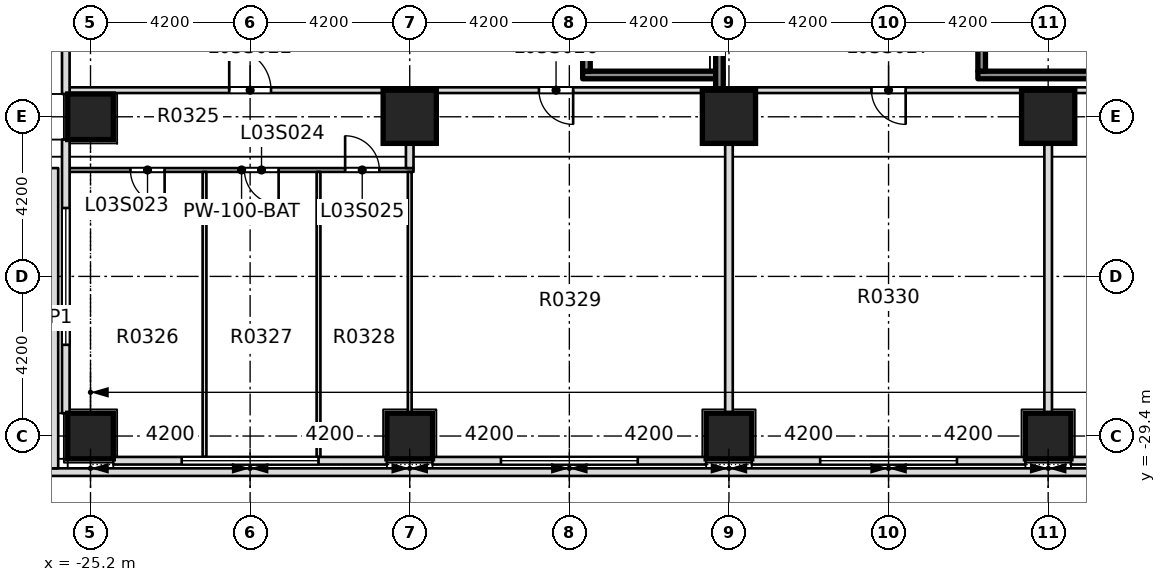
"""IFC4 building model, lengths in metres.
Left out: names, types, materials, properties, quantities, classifications, styles, units other than length and angle.
Written with IfcOpenShell. Run it as: python <this file> out.ifc"""

import sys

from ifc_helpers import new_model, si_unit, direction, frame, frame_2d, origin, origin_2d, place, context, subcontext, project, spatial, rectangle, extrude, element, fill, save


model = new_model("IFC4")
c1 = context("Model", 3, precision=1e-05, world=origin(), true_north=direction((0.0, 1.0)))
c2 = subcontext(c1, "Body", "Model", "MODEL_VIEW")
j1 = project(units=[si_unit("LENGTHUNIT", "METRE"), si_unit("PLANEANGLEUNIT", "RADIAN")], contexts=[c1])
p1 = place(None, origin())
s1 = spatial("IfcSite", under=j1, at=p1, CompositionType="ELEMENT")
p2 = place(p1, origin())
s2 = spatial("IfcBuilding", under=s1, at=p2, CompositionType="ELEMENT")
p3 = place(p2, frame((0.0, 0.0, 20.0)))
s3 = spatial("IfcBuildingStorey", under=s2, at=p3, CompositionType="ELEMENT", Elevation=20.0)
for number, where, z_axis, x_axis in (
    (1, (-16.8, -21.0, -0.4), (0.0, 0.0, 1.0), (1.0, 0.0, 0.0)),
    (2, (-8.4, -21.0, -0.4), (0.0, 0.0, 1.0), (1.0, 0.0, 0.0)),
    (3, (0.0, -21.0, -0.4), (0.0, 0.0, 1.0), (1.0, 0.0, 0.0)),
):
    element("IfcColumn", number, at=place(p3, frame(where, z_axis=z_axis, x_axis=x_axis)), inside=s3, PredefinedType="COLUMN", context=c2, shape_type="SweptSolid", body=[
        extrude(rectangle(XDim=1.4, YDim=1.4, at=origin_2d()), origin(), (0.0, 0.0, 1.0), 5.0),
    ])
for number, where, z_axis, x_axis in (
    (4, (-25.2, -29.4, 0.0), (0.0, 0.0, 1.0), (1.0, 0.0, 0.0)),
    (5, (-16.8, -29.4, 0.0), (0.0, 0.0, 1.0), (1.0, 0.0, 0.0)),
    (6, (-8.4, -29.4, 0.0), (0.0, 0.0, 1.0), (1.0, 0.0, 0.0)),
    (7, (0.0, -29.4, 0.0), (0.0, 0.0, 1.0), (1.0, 0.0, 0.0)),
):
    element("IfcColumn", number, at=place(p3, frame(where, z_axis=z_axis, x_axis=x_axis)), inside=s3, PredefinedType="COLUMN", context=c2, shape_type="SweptSolid", body=[
        extrude(rectangle(XDim=1.2, YDim=1.2, at=origin_2d()), origin(), (0.0, 0.0, 1.0), 4.6),
    ])
p4 = place(p3, frame((-25.2, -21.0, 0.0), z_axis=(0.0, 0.0, 1.0), x_axis=(1.0, 0.0, 0.0)))
e8 = element("IfcColumn", 8, at=p4, inside=s3, PredefinedType="COLUMN", context=c2, shape_type="SweptSolid", body=[
    extrude(rectangle(XDim=1.2, YDim=1.2, at=origin_2d()), origin(), (0.0, 0.0, 1.0), 5.0),
])
p5 = place(p3, frame((-26.25, -30.35, 5.0), z_axis=(0.0, 0.0, 1.0), x_axis=(1.0, 0.0, 0.0)))
e9 = element("IfcWall", 9, at=p5, inside=s3, PredefinedType="PARAPET", context=c2, shape_type="SweptSolid", body=[
    extrude(rectangle(XDim=77.7, YDim=0.2, at=frame_2d((38.85, 0.0))), origin(), (0.0, 0.0, 1.0), 1.2),
])
p6 = place(p3, frame((-26.15, -30.25, 5.0), z_axis=(0.0, 0.0, 1.0), x_axis=(0.0, 1.0, 0.0)))
e10 = element("IfcWall", 10, at=p6, inside=s3, PredefinedType="PARAPET", context=c2, shape_type="SweptSolid", body=[
    extrude(rectangle(XDim=7.9, YDim=0.2, at=frame_2d((3.95, 0.0))), origin(), (0.0, 0.0, 1.0), 1.2),
])
p7 = place(p3, frame((-25.75, -22.4, 0.0), z_axis=(0.0, 0.0, 1.0), x_axis=(1.0, 0.0, 0.0)))
e11 = element("IfcWall", 11, at=p7, inside=s3, PredefinedType="PARTITIONING", context=c2, shape_type="SweptSolid", body=[
    extrude(rectangle(XDim=9.05, YDim=0.1, at=frame_2d((4.525, 0.0))), origin(), (0.0, 0.0, 1.0), 4.6),
])
p8 = place(p7, frame((1.6, 0.0, 0.0)))
e12 = element("IfcOpeningElement", 12, at=p8, cuts=e11, PredefinedType="OPENING", context=c2, shape_type="SweptSolid", body=[
    extrude(rectangle(XDim=0.9, YDim=2.1, at=frame_2d((0.45, 1.05))), frame((0.0, 0.06, 0.0), z_axis=(0.0, -1.0, 0.0), x_axis=(1.0, 0.0, 0.0)), (0.0, 0.0, 1.0), 0.12),
])
p9 = place(p7, frame((4.6, 0.0, 0.0)))
e13 = element("IfcOpeningElement", 13, at=p9, cuts=e11, PredefinedType="OPENING", context=c2, shape_type="SweptSolid", body=[
    extrude(rectangle(XDim=0.9, YDim=2.1, at=frame_2d((0.45, 1.05))), frame((0.0, 0.06, 0.0), z_axis=(0.0, -1.0, 0.0), x_axis=(1.0, 0.0, 0.0)), (0.0, 0.0, 1.0), 0.12),
])
p10 = place(p7, frame((7.25, 0.0, 0.0)))
e14 = element("IfcOpeningElement", 14, at=p10, cuts=e11, PredefinedType="OPENING", context=c2, shape_type="SweptSolid", body=[
    extrude(rectangle(XDim=0.9, YDim=2.1, at=frame_2d((0.45, 1.05))), frame((0.0, 0.06, 0.0), z_axis=(0.0, -1.0, 0.0), x_axis=(1.0, 0.0, 0.0)), (0.0, 0.0, 1.0), 0.12),
])
p11 = place(p3, frame((-25.75, -20.3, 0.0), z_axis=(0.0, 0.0, 1.0), x_axis=(1.0, 0.0, 0.0)))
e15 = element("IfcWall", 15, at=p11, inside=s3, PredefinedType="PARTITIONING", context=c2, shape_type="SweptSolid", body=[
    extrude(rectangle(XDim=59.425, YDim=0.15, at=frame_2d((29.712, 0.0))), origin(), (0.0, 0.0, 1.0), 4.6),
])
p12 = place(p11, frame((4.2, 0.0, 0.0)))
e16 = element("IfcOpeningElement", 16, at=p12, cuts=e15, PredefinedType="OPENING", context=c2, shape_type="SweptSolid", body=[
    extrude(rectangle(XDim=1.1, YDim=2.1, at=frame_2d((0.55, 1.05))), frame((0.0, 0.085, 0.0), z_axis=(0.0, -1.0, 0.0), x_axis=(1.0, 0.0, 0.0)), (0.0, 0.0, 1.0), 0.17),
])
p13 = place(p11, frame((12.35, 0.0, 0.0)))
e17 = element("IfcOpeningElement", 17, at=p13, cuts=e15, PredefinedType="OPENING", context=c2, shape_type="SweptSolid", body=[
    extrude(rectangle(XDim=0.9, YDim=2.1, at=frame_2d((0.45, 1.05))), frame((0.0, 0.085, 0.0), z_axis=(0.0, -1.0, 0.0), x_axis=(1.0, 0.0, 0.0)), (0.0, 0.0, 1.0), 0.17),
])
p14 = place(p11, frame((21.1, 0.0, 0.0)))
e18 = element("IfcOpeningElement", 18, at=p14, cuts=e15, PredefinedType="OPENING", context=c2, shape_type="SweptSolid", body=[
    extrude(rectangle(XDim=0.9, YDim=2.1, at=frame_2d((0.45, 1.05))), frame((0.0, 0.085, 0.0), z_axis=(0.0, -1.0, 0.0), x_axis=(1.0, 0.0, 0.0)), (0.0, 0.0, 1.0), 0.17),
])
p15 = place(p11, frame((32.2, 0.0, 0.0)))
e19 = element("IfcOpeningElement", 19, at=p15, cuts=e15, PredefinedType="OPENING", context=c2, shape_type="SweptSolid", body=[
    extrude(rectangle(XDim=1.2, YDim=2.1, at=frame_2d((0.6, 1.05))), frame((0.0, 0.085, 0.0), z_axis=(0.0, -1.0, 0.0), x_axis=(1.0, 0.0, 0.0)), (0.0, 0.0, 1.0), 0.17),
])
p16 = place(p11, frame((46.2, 0.0, 0.0)))
e20 = element("IfcOpeningElement", 20, at=p16, cuts=e15, PredefinedType="OPENING", context=c2, shape_type="SweptSolid", body=[
    extrude(rectangle(XDim=1.1, YDim=2.1, at=frame_2d((0.55, 1.05))), frame((0.0, 0.085, 0.0), z_axis=(0.0, -1.0, 0.0), x_axis=(1.0, 0.0, 0.0)), (0.0, 0.0, 1.0), 0.17),
])
p17 = place(p11, frame((54.7, 0.0, 0.0)))
e21 = element("IfcOpeningElement", 21, at=p17, cuts=e15, PredefinedType="OPENING", context=c2, shape_type="SweptSolid", body=[
    extrude(rectangle(XDim=0.9, YDim=2.1, at=frame_2d((0.45, 1.05))), frame((0.0, 0.085, 0.0), z_axis=(0.0, -1.0, 0.0), x_axis=(1.0, 0.0, 0.0)), (0.0, 0.0, 1.0), 0.17),
])
for number, where, z_axis, x_axis in (
    (22, (-22.2, -29.95, 0.0), (0.0, 0.0, 1.0), (0.0, 1.0, 0.0)),
    (23, (-19.2, -29.95, 0.0), (0.0, 0.0, 1.0), (0.0, 1.0, 0.0)),
    (24, (-16.8, -29.95, 0.0), (0.0, 0.0, 1.0), (0.0, 1.0, 0.0)),
):
    element("IfcWall", number, at=place(p3, frame(where, z_axis=z_axis, x_axis=x_axis)), inside=s3, PredefinedType="PARTITIONING", context=c2, shape_type="SweptSolid", body=[
        extrude(rectangle(XDim=7.5, YDim=0.1, at=frame_2d((3.75, 0.0))), origin(), (0.0, 0.0, 1.0), 4.6),
    ])
p18 = place(p3, frame((-16.8, -22.35, 0.0), z_axis=(0.0, 0.0, 1.0), x_axis=(0.0, 1.0, 0.0)))
e25 = element("IfcWall", 25, at=p18, inside=s3, PredefinedType="PARTITIONING", context=c2, shape_type="SweptSolid", body=[
    extrude(rectangle(XDim=1.975, YDim=0.2, at=frame_2d((0.988, 0.0))), origin(), (0.0, 0.0, 1.0), 4.6),
])
for number, where, z_axis, x_axis in (
    (26, (-8.4, -29.95, 0.0), (0.0, 0.0, 1.0), (0.0, 1.0, 0.0)),
    (27, (0.0, -29.95, 0.0), (0.0, 0.0, 1.0), (0.0, 1.0, 0.0)),
):
    element("IfcWall", number, at=place(p3, frame(where, z_axis=z_axis, x_axis=x_axis)), inside=s3, PredefinedType="PARTITIONING", context=c2, shape_type="SweptSolid", body=[
        extrude(rectangle(XDim=9.575, YDim=0.2, at=frame_2d((4.788, 0.0))), origin(), (0.0, 0.0, 1.0), 4.6),
    ])
p19 = place(p3, frame((-24.6, -30.05, 0.0), z_axis=(0.0, 0.0, 1.0), x_axis=(1.0, 0.0, 0.0)))
e28 = element("IfcWall", 28, at=p19, inside=s3, PredefinedType="STANDARD", context=c2, shape_type="SweptSolid", body=[
    extrude(rectangle(XDim=7.2, YDim=0.2, at=frame_2d((3.6, 0.0))), origin(), (0.0, 0.0, 1.0), 4.6),
])
p20 = place(p19, frame((1.8, 0.0, 0.9)))
e29 = element("IfcOpeningElement", 29, at=p20, cuts=e28, PredefinedType="OPENING", context=c2, shape_type="SweptSolid", body=[
    extrude(rectangle(XDim=3.6, YDim=2.8, at=frame_2d((1.8, 1.4))), frame((0.0, 0.11, 0.0), z_axis=(0.0, -1.0, 0.0), x_axis=(1.0, 0.0, 0.0)), (0.0, 0.0, 1.0), 0.22),
])
p21 = place(p3, frame((-16.2, -30.05, 0.0), z_axis=(0.0, 0.0, 1.0), x_axis=(1.0, 0.0, 0.0)))
e30 = element("IfcWall", 30, at=p21, inside=s3, PredefinedType="STANDARD", context=c2, shape_type="SweptSolid", body=[
    extrude(rectangle(XDim=7.2, YDim=0.2, at=frame_2d((3.6, 0.0))), origin(), (0.0, 0.0, 1.0), 4.6),
])
p22 = place(p21, frame((1.8, 0.0, 0.9)))
e31 = element("IfcOpeningElement", 31, at=p22, cuts=e30, PredefinedType="OPENING", context=c2, shape_type="SweptSolid", body=[
    extrude(rectangle(XDim=3.6, YDim=2.8, at=frame_2d((1.8, 1.4))), frame((0.0, 0.11, 0.0), z_axis=(0.0, -1.0, 0.0), x_axis=(1.0, 0.0, 0.0)), (0.0, 0.0, 1.0), 0.22),
])
p23 = place(p3, frame((-7.8, -30.05, 0.0), z_axis=(0.0, 0.0, 1.0), x_axis=(1.0, 0.0, 0.0)))
e32 = element("IfcWall", 32, at=p23, inside=s3, PredefinedType="STANDARD", context=c2, shape_type="SweptSolid", body=[
    extrude(rectangle(XDim=7.2, YDim=0.2, at=frame_2d((3.6, 0.0))), origin(), (0.0, 0.0, 1.0), 4.6),
])
p24 = place(p23, frame((1.8, 0.0, 0.9)))
e33 = element("IfcOpeningElement", 33, at=p24, cuts=e32, PredefinedType="OPENING", context=c2, shape_type="SweptSolid", body=[
    extrude(rectangle(XDim=3.6, YDim=2.8, at=frame_2d((1.8, 1.4))), frame((0.0, 0.11, 0.0), z_axis=(0.0, -1.0, 0.0), x_axis=(1.0, 0.0, 0.0)), (0.0, 0.0, 1.0), 0.22),
])
p25 = place(p3, frame((0.6, -30.05, 0.0), z_axis=(0.0, 0.0, 1.0), x_axis=(1.0, 0.0, 0.0)))
e34 = element("IfcWall", 34, at=p25, inside=s3, PredefinedType="STANDARD", context=c2, shape_type="SweptSolid", body=[
    extrude(rectangle(XDim=7.2, YDim=0.2, at=frame_2d((3.6, 0.0))), origin(), (0.0, 0.0, 1.0), 4.6),
])
p26 = place(p25, frame((1.8, 0.0, 0.9)))
e35 = element("IfcOpeningElement", 35, at=p26, cuts=e34, PredefinedType="OPENING", context=c2, shape_type="SweptSolid", body=[
    extrude(rectangle(XDim=3.6, YDim=2.8, at=frame_2d((1.8, 1.4))), frame((0.0, 0.11, 0.0), z_axis=(0.0, -1.0, 0.0), x_axis=(1.0, 0.0, 0.0)), (0.0, 0.0, 1.0), 0.22),
])
p27 = place(p3, frame((-25.85, -13.3, 0.0), z_axis=(0.0, 0.0, 1.0), x_axis=(0.0, -1.0, 0.0)))
e36 = element("IfcWall", 36, at=p27, inside=s3, PredefinedType="STANDARD", context=c2, shape_type="SweptSolid", body=[
    extrude(rectangle(XDim=7.1, YDim=0.2, at=frame_2d((3.55, 0.0))), origin(), (0.0, 0.0, 1.0), 4.6),
])
p28 = place(p27, frame((1.75, 0.0, 0.9)))
e37 = element("IfcOpeningElement", 37, at=p28, cuts=e36, PredefinedType="OPENING", context=c2, shape_type="SweptSolid", body=[
    extrude(rectangle(XDim=3.6, YDim=2.8, at=frame_2d((1.8, 1.4))), frame((0.0, 0.11, 0.0), z_axis=(0.0, -1.0, 0.0), x_axis=(1.0, 0.0, 0.0)), (0.0, 0.0, 1.0), 0.22),
])
p29 = place(p3, frame((-25.85, -21.6, 0.0), z_axis=(0.0, 0.0, 1.0), x_axis=(0.0, -1.0, 0.0)))
e38 = element("IfcWall", 38, at=p29, inside=s3, PredefinedType="STANDARD", context=c2, shape_type="SweptSolid", body=[
    extrude(rectangle(XDim=7.2, YDim=0.2, at=frame_2d((3.6, 0.0))), origin(), (0.0, 0.0, 1.0), 4.6),
])
p30 = place(p29, frame((1.8, 0.0, 0.9)))
e39 = element("IfcOpeningElement", 39, at=p30, cuts=e38, PredefinedType="OPENING", context=c2, shape_type="SweptSolid", body=[
    extrude(rectangle(XDim=3.6, YDim=2.8, at=frame_2d((1.8, 1.4))), frame((0.0, 0.11, 0.0), z_axis=(0.0, -1.0, 0.0), x_axis=(1.0, 0.0, 0.0)), (0.0, 0.0, 1.0), 0.22),
])
p31 = place(p3, frame((-12.25, -19.9, 0.0), z_axis=(0.0, 0.0, 1.0), x_axis=(1.0, 0.0, 0.0)))
e40 = element("IfcWall", 40, at=p31, inside=s3, PredefinedType="SOLIDWALL", context=c2, shape_type="SweptSolid", body=[
    extrude(rectangle(XDim=3.7, YDim=0.2, at=frame_2d((1.85, 0.0))), origin(), (0.0, 0.0, 1.0), 4.6),
])
p32 = place(p3, frame((-12.15, -19.8, 0.0), z_axis=(0.0, 0.0, 1.0), x_axis=(0.0, 1.0, 0.0)))
e41 = element("IfcWall", 41, at=p32, inside=s3, PredefinedType="SOLIDWALL", context=c2, shape_type="SweptSolid", body=[
    extrude(rectangle(XDim=6.6, YDim=0.2, at=frame_2d((3.3, 0.0))), origin(), (0.0, 0.0, 1.0), 4.6),
])
p33 = place(p3, frame((-8.65, -20.3, 0.0), z_axis=(0.0, 0.0, 1.0), x_axis=(0.0, 1.0, 0.0)))
e42 = element("IfcWall", 42, at=p33, inside=s3, PredefinedType="SOLIDWALL", context=c2, shape_type="SweptSolid", body=[
    extrude(rectangle(XDim=7.1, YDim=0.2, at=frame_2d((3.55, 0.0))), origin(), (0.0, 0.0, 1.0), 4.6),
])
p34 = place(p3, frame((-1.85, -19.9, 0.0), z_axis=(0.0, 0.0, 1.0), x_axis=(1.0, 0.0, 0.0)))
e43 = element("IfcWall", 43, at=p34, inside=s3, PredefinedType="SOLIDWALL", context=c2, shape_type="SweptSolid", body=[
    extrude(rectangle(XDim=3.7, YDim=0.2, at=frame_2d((1.85, 0.0))), origin(), (0.0, 0.0, 1.0), 4.6),
])
p35 = place(p3, frame((-1.75, -19.8, 0.0), z_axis=(0.0, 0.0, 1.0), x_axis=(0.0, 1.0, 0.0)))
e44 = element("IfcWall", 44, at=p35, inside=s3, PredefinedType="SOLIDWALL", context=c2, shape_type="SweptSolid", body=[
    extrude(rectangle(XDim=6.6, YDim=0.2, at=frame_2d((3.3, 0.0))), origin(), (0.0, 0.0, 1.0), 4.6),
])
p36 = place(p12, origin())
e45 = element("IfcDoor", 45, at=p36, inside=s3, OperationType="SINGLE_SWING_RIGHT", PredefinedType="DOOR", context=c2, shape_type="SweptSolid", body=[
    extrude(rectangle(XDim=1.1, YDim=2.1, at=frame_2d((0.55, 1.05))), frame((0.0, 0.025, 0.0), z_axis=(0.0, -1.0, 0.0), x_axis=(1.0, 0.0, 0.0)), (0.0, 0.0, 1.0), 0.05),
])
fill(e16, e45)
p37 = place(p8, origin())
e46 = element("IfcDoor", 46, at=p37, inside=s3, OperationType="SINGLE_SWING_RIGHT", PredefinedType="DOOR", context=c2, shape_type="SweptSolid", body=[
    extrude(rectangle(XDim=0.9, YDim=2.1, at=frame_2d((0.45, 1.05))), frame((0.0, 0.025, 0.0), z_axis=(0.0, -1.0, 0.0), x_axis=(1.0, 0.0, 0.0)), (0.0, 0.0, 1.0), 0.05),
])
fill(e12, e46)
p38 = place(p9, origin())
e47 = element("IfcDoor", 47, at=p38, inside=s3, OperationType="SINGLE_SWING_RIGHT", PredefinedType="DOOR", context=c2, shape_type="SweptSolid", body=[
    extrude(rectangle(XDim=0.9, YDim=2.1, at=frame_2d((0.45, 1.05))), frame((0.0, 0.025, 0.0), z_axis=(0.0, -1.0, 0.0), x_axis=(1.0, 0.0, 0.0)), (0.0, 0.0, 1.0), 0.05),
])
fill(e13, e47)
p39 = place(p10, origin())
e48 = element("IfcDoor", 48, at=p39, inside=s3, OperationType="SINGLE_SWING_RIGHT", PredefinedType="DOOR", context=c2, shape_type="SweptSolid", body=[
    extrude(rectangle(XDim=0.9, YDim=2.1, at=frame_2d((0.45, 1.05))), frame((0.0, 0.025, 0.0), z_axis=(0.0, -1.0, 0.0), x_axis=(1.0, 0.0, 0.0)), (0.0, 0.0, 1.0), 0.05),
])
fill(e14, e48)
p40 = place(p13, origin())
e49 = element("IfcDoor", 49, at=p40, inside=s3, OperationType="SINGLE_SWING_LEFT", PredefinedType="DOOR", context=c2, shape_type="SweptSolid", body=[
    extrude(rectangle(XDim=0.9, YDim=2.1, at=frame_2d((0.45, 1.05))), frame((0.0, 0.025, 0.0), z_axis=(0.0, -1.0, 0.0), x_axis=(1.0, 0.0, 0.0)), (0.0, 0.0, 1.0), 0.05),
])
fill(e17, e49)
p41 = place(p14, origin())
e50 = element("IfcDoor", 50, at=p41, inside=s3, OperationType="SINGLE_SWING_LEFT", PredefinedType="DOOR", context=c2, shape_type="SweptSolid", body=[
    extrude(rectangle(XDim=0.9, YDim=2.1, at=frame_2d((0.45, 1.05))), frame((0.0, 0.025, 0.0), z_axis=(0.0, -1.0, 0.0), x_axis=(1.0, 0.0, 0.0)), (0.0, 0.0, 1.0), 0.05),
])
fill(e18, e50)
p42 = place(p20, origin())
e51 = element("IfcWindow", 51, at=p42, inside=s3, PartitioningType="SINGLE_PANEL", PredefinedType="WINDOW", context=c2, shape_type="SweptSolid", body=[
    extrude(rectangle(XDim=3.6, YDim=2.8, at=frame_2d((1.8, 1.4))), frame((0.0, 0.03, 0.0), z_axis=(0.0, -1.0, 0.0), x_axis=(1.0, 0.0, 0.0)), (0.0, 0.0, 1.0), 0.06),
])
fill(e29, e51)
p43 = place(p22, origin())
e52 = element("IfcWindow", 52, at=p43, inside=s3, PartitioningType="SINGLE_PANEL", PredefinedType="WINDOW", context=c2, shape_type="SweptSolid", body=[
    extrude(rectangle(XDim=3.6, YDim=2.8, at=frame_2d((1.8, 1.4))), frame((0.0, 0.03, 0.0), z_axis=(0.0, -1.0, 0.0), x_axis=(1.0, 0.0, 0.0)), (0.0, 0.0, 1.0), 0.06),
])
fill(e31, e52)
p44 = place(p24, origin())
e53 = element("IfcWindow", 53, at=p44, inside=s3, PartitioningType="SINGLE_PANEL", PredefinedType="WINDOW", context=c2, shape_type="SweptSolid", body=[
    extrude(rectangle(XDim=3.6, YDim=2.8, at=frame_2d((1.8, 1.4))), frame((0.0, 0.03, 0.0), z_axis=(0.0, -1.0, 0.0), x_axis=(1.0, 0.0, 0.0)), (0.0, 0.0, 1.0), 0.06),
])
fill(e33, e53)
p45 = place(p30, origin())
e54 = element("IfcWindow", 54, at=p45, inside=s3, PartitioningType="SINGLE_PANEL", PredefinedType="WINDOW", context=c2, shape_type="SweptSolid", body=[
    extrude(rectangle(XDim=3.6, YDim=2.8, at=frame_2d((1.8, 1.4))), frame((0.0, 0.03, 0.0), z_axis=(0.0, -1.0, 0.0), x_axis=(1.0, 0.0, 0.0)), (0.0, 0.0, 1.0), 0.06),
])
fill(e39, e54)
save(model, sys.argv[1])
